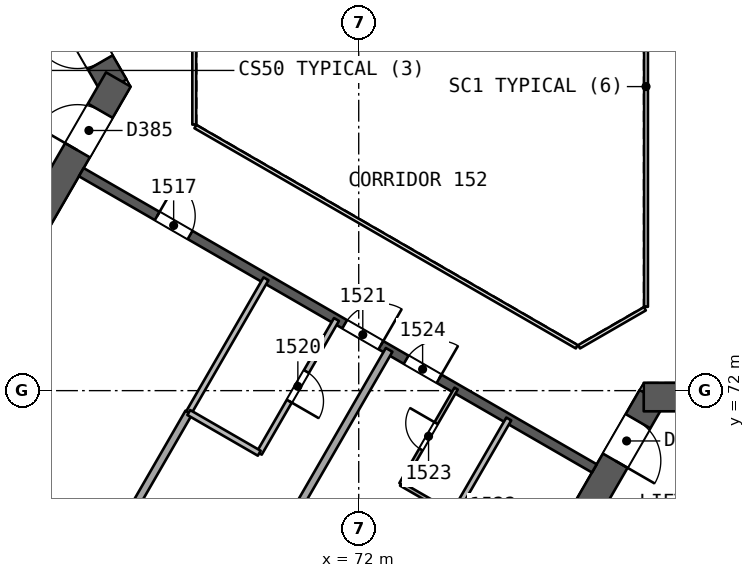
"""IFC4 building model, lengths in metres.
Left out: names, types, materials, properties, quantities, classifications, styles, units other than length and angle.
Written with IfcOpenShell. Run it as: python <this file> out.ifc"""

import sys

from ifc_helpers import new_model, si_unit, direction, frame, frame_2d, origin, place, context, subcontext, project, spatial, rectangle, extrude, element, fill, save


model = new_model("IFC4")
c1 = context("Model", 3, precision=1e-05, world=origin(), true_north=direction((0.0, 1.0)))
c2 = subcontext(c1, "Body", "Model", "MODEL_VIEW")
j1 = project(units=[si_unit("LENGTHUNIT", "METRE"), si_unit("PLANEANGLEUNIT", "RADIAN")], contexts=[c1])
p1 = place(None, origin())
s1 = spatial("IfcSite", under=j1, at=p1, CompositionType="ELEMENT")
p2 = place(p1, origin())
s2 = spatial("IfcBuilding", under=s1, at=p2, CompositionType="ELEMENT")
p3 = place(p2, frame((0.0, 0.0, 68.4)))
s3 = spatial("IfcBuildingStorey", under=s2, at=p3, CompositionType="ELEMENT", Elevation=68.4)
p4 = place(p3, frame((65.567, 80.0, 0.0), z_axis=(0.0, 0.0, 1.0), x_axis=(-0.499988615364, 0.866031976607, 0.0)))
e1 = element("IfcWall", 1, at=p4, inside=s3, PredefinedType="SHEAR", context=c2, shape_type="SweptSolid", body=[
    extrude(rectangle(XDim=10.163, YDim=0.75, at=frame_2d((5.082, 0.0))), origin(), (0.0, 0.0, 1.0), 3.7),
])
p5 = place(p4, frame((0.733, 0.0, 0.0)))
e2 = element("IfcOpeningElement", 2, at=p5, cuts=e1, PredefinedType="OPENING", context=c2, shape_type="SweptSolid", body=[
    extrude(rectangle(XDim=1.2, YDim=2.1, at=frame_2d((0.6, 1.05))), frame((0.0, 0.385, 0.0), z_axis=(0.0, -1.0, 0.0), x_axis=(1.0, 0.0, 0.0)), (0.0, 0.0, 1.0), 0.771),
])
p6 = place(p3, frame((60.673, 71.523, 0.0), z_axis=(0.0, 0.0, 1.0), x_axis=(0.499997052475, 0.866027105532, 0.0)))
e3 = element("IfcWall", 3, at=p6, inside=s3, PredefinedType="SHEAR", context=c2, shape_type="SweptSolid", body=[
    extrude(rectangle(XDim=10.005, YDim=0.75, at=frame_2d((5.002, 0.0))), origin(), (0.0, 0.0, 1.0), 3.7),
])
p7 = place(p6, frame((7.855, 0.0, 0.0)))
e4 = element("IfcOpeningElement", 4, at=p7, cuts=e3, PredefinedType="OPENING", context=c2, shape_type="SweptSolid", body=[
    extrude(rectangle(XDim=1.2, YDim=2.1, at=frame_2d((0.6, 1.05))), frame((0.0, 0.385, 0.0), z_axis=(0.0, -1.0, 0.0), x_axis=(1.0, 0.0, 0.0)), (0.0, 0.0, 1.0), 0.771),
])
p8 = place(p3, frame((79.717, 71.831, 0.0), z_axis=(0.0, 0.0, 1.0), x_axis=(-0.499996230114, -0.866027580318, 0.0)))
e5 = element("IfcWall", 5, at=p8, inside=s3, PredefinedType="SHEAR", context=c2, shape_type="SweptSolid", body=[
    extrude(rectangle(XDim=10.164, YDim=0.75, at=frame_2d((5.082, 0.0))), origin(), (0.0, 0.0, 1.0), 3.7),
])
p9 = place(p8, frame((0.733, 0.0, 0.0)))
e6 = element("IfcOpeningElement", 6, at=p9, cuts=e5, PredefinedType="OPENING", context=c2, shape_type="SweptSolid", body=[
    extrude(rectangle(XDim=1.2, YDim=2.1, at=frame_2d((0.6, 1.05))), frame((0.0, 0.385, 0.0), z_axis=(0.0, -1.0, 0.0), x_axis=(1.0, 0.0, 0.0)), (0.0, 0.0, 1.0), 0.771),
])
p10 = place(p3, frame((89.505, 71.831, 0.0), z_axis=(0.0, 0.0, 1.0), x_axis=(-1.0, 0.0, 0.0)))
e7 = element("IfcWall", 7, at=p10, inside=s3, PredefinedType="SHEAR", context=c2, shape_type="SweptSolid", body=[
    extrude(rectangle(XDim=10.005, YDim=0.75, at=frame_2d((5.002, 0.0))), origin(), (0.0, 0.0, 1.0), 3.7),
])
p11 = place(p10, frame((7.855, 0.0, 0.0)))
e8 = element("IfcOpeningElement", 8, at=p11, cuts=e7, PredefinedType="OPENING", context=c2, shape_type="SweptSolid", body=[
    extrude(rectangle(XDim=1.2, YDim=2.1, at=frame_2d((0.6, 1.05))), frame((0.0, 0.385, 0.0), z_axis=(0.0, -1.0, 0.0), x_axis=(1.0, 0.0, 0.0)), (0.0, 0.0, 1.0), 0.771),
])
p12 = place(p3, frame((64.7, 77.748, 0.0), z_axis=(0.0, 0.0, 1.0), x_axis=(0.866026492143, -0.499998114903, 0.0)))
e9 = element("IfcWall", 9, at=p12, inside=s3, PredefinedType="SHEAR", context=c2, shape_type="SweptSolid", body=[
    extrude(rectangle(XDim=15.588, YDim=0.25, at=frame_2d((7.794, 0.0))), origin(), (0.0, 0.0, 1.0), 3.2),
])
p13 = place(p12, frame((2.306, 0.0, 0.0)))
e10 = element("IfcOpeningElement", 10, at=p13, cuts=e9, PredefinedType="OPENING", context=c2, shape_type="SweptSolid", body=[
    extrude(rectangle(XDim=1.0, YDim=2.1, at=frame_2d((0.5, 1.05))), frame((0.0, 0.135, 0.0), z_axis=(0.0, -1.0, 0.0), x_axis=(1.0, 0.0, 0.0)), (0.0, 0.0, 1.0), 0.271),
])
p14 = place(p12, frame((8.003, 0.0, 0.0)))
e11 = element("IfcOpeningElement", 11, at=p14, cuts=e9, PredefinedType="OPENING", context=c2, shape_type="SweptSolid", body=[
    extrude(rectangle(XDim=1.1, YDim=2.1, at=frame_2d((0.55, 1.05))), frame((0.0, 0.135, 0.0), z_axis=(0.0, -1.0, 0.0), x_axis=(1.0, 0.0, 0.0)), (0.0, 0.0, 1.0), 0.271),
])
p15 = place(p12, frame((9.871, 0.0, 0.0)))
e12 = element("IfcOpeningElement", 12, at=p15, cuts=e9, PredefinedType="OPENING", context=c2, shape_type="SweptSolid", body=[
    extrude(rectangle(XDim=1.0, YDim=2.1, at=frame_2d((0.5, 1.05))), frame((0.0, 0.135, 0.0), z_axis=(0.0, -1.0, 0.0), x_axis=(1.0, 0.0, 0.0)), (0.0, 0.0, 1.0), 0.271),
])
p16 = place(p3, frame((62.822, 63.272, 0.0), z_axis=(0.0, 0.0, 1.0), x_axis=(0.50001657107, 0.866015836261, 0.0)))
e13 = element("IfcWall", 13, at=p16, inside=s3, PredefinedType="PARTITIONING", context=c2, shape_type="SweptSolid", body=[
    extrude(rectangle(XDim=9.413, YDim=0.2, at=frame_2d((4.707, 0.0))), origin(), (0.0, 0.0, 1.0), 3.2),
])
p17 = place(p3, frame((67.529, 71.424, 0.0), z_axis=(0.0, 0.0, 1.0), x_axis=(0.499984252764, 0.866034495264, 0.0)))
e14 = element("IfcWall", 14, at=p17, inside=s3, PredefinedType="PARTITIONING", context=c2, shape_type="SweptSolid", body=[
    extrude(rectangle(XDim=4.063, YDim=0.15, at=frame_2d((2.032, 0.0))), origin(), (0.0, 0.0, 1.0), 3.2),
])
p18 = place(p3, frame((71.414, 73.872, 0.0), z_axis=(0.0, 0.0, 1.0), x_axis=(-0.499984252764, -0.866034495264, 0.0)))
e15 = element("IfcWall", 15, at=p18, inside=s3, PredefinedType="PARTITIONING", context=c2, shape_type="SweptSolid", body=[
    extrude(rectangle(XDim=4.063, YDim=0.15, at=frame_2d((2.032, 0.0))), origin(), (0.0, 0.0, 1.0), 3.2),
])
p19 = place(p18, frame((1.582, 0.0, 0.0)))
e16 = element("IfcOpeningElement", 16, at=p19, cuts=e15, PredefinedType="OPENING", context=c2, shape_type="SweptSolid", body=[
    extrude(rectangle(XDim=0.9, YDim=2.1, at=frame_2d((0.45, 1.05))), frame((0.0, 0.085, 0.0), z_axis=(0.0, -1.0, 0.0), x_axis=(1.0, 0.0, 0.0)), (0.0, 0.0, 1.0), 0.171),
])
p20 = place(p3, frame((69.383, 70.353, 0.0), z_axis=(0.0, 0.0, 1.0), x_axis=(-0.866024183959, 0.500002112793, 0.0)))
e17 = element("IfcWall", 17, at=p20, inside=s3, PredefinedType="PARTITIONING", context=c2, shape_type="SweptSolid", body=[
    extrude(rectangle(XDim=2.141, YDim=0.15, at=frame_2d((1.071, 0.0))), origin(), (0.0, 0.0, 1.0), 3.2),
])
p21 = place(p3, frame((66.062, 61.401, 0.0), z_axis=(0.0, 0.0, 1.0), x_axis=(0.500006826849, 0.866021462265, 0.0)))
e18 = element("IfcWall", 18, at=p21, inside=s3, PredefinedType="PARTITIONING", context=c2, shape_type="SweptSolid", body=[
    extrude(rectangle(XDim=13.476, YDim=0.2, at=frame_2d((6.738, 0.0))), origin(), (0.0, 0.0, 1.0), 3.2),
])
p22 = place(p3, frame((74.498, 68.743, 0.0), z_axis=(0.0, 0.0, 1.0), x_axis=(-0.865989903783, 0.500061482766, 0.0)))
e19 = element("IfcWall", 19, at=p22, inside=s3, PredefinedType="PARTITIONING", context=c2, shape_type="SweptSolid", body=[
    extrude(rectangle(XDim=1.6, YDim=0.1, at=frame_2d((0.8, 0.0))), origin(), (0.0, 0.0, 1.0), 3.2),
])
p23 = place(p3, frame((73.113, 69.543, 0.0), z_axis=(0.0, 0.0, 1.0), x_axis=(0.499987231761, 0.866032775405, 0.0)))
e20 = element("IfcWall", 20, at=p23, inside=s3, PredefinedType="PARTITIONING", context=c2, shape_type="SweptSolid", body=[
    extrude(rectangle(XDim=2.9, YDim=0.1, at=frame_2d((1.45, 0.0))), origin(), (0.0, 0.0, 1.0), 3.2),
])
p24 = place(p23, frame((1.05, 0.0, 0.0)))
e21 = element("IfcOpeningElement", 21, at=p24, cuts=e20, PredefinedType="OPENING", context=c2, shape_type="SweptSolid", body=[
    extrude(rectangle(XDim=0.8, YDim=2.1, at=frame_2d((0.4, 1.05))), frame((0.0, 0.061, 0.0), z_axis=(0.0, -1.0, 0.0), x_axis=(1.0, 0.0, 0.0)), (0.0, 0.0, 1.0), 0.121),
])
p25 = place(p3, frame((75.948, 71.254, 0.0), z_axis=(0.0, 0.0, 1.0), x_axis=(-0.499987231761, -0.866032775405, 0.0)))
e22 = element("IfcWall", 22, at=p25, inside=s3, PredefinedType="PARTITIONING", context=c2, shape_type="SweptSolid", body=[
    extrude(rectangle(XDim=2.9, YDim=0.15, at=frame_2d((1.45, 0.0))), origin(), (0.0, 0.0, 1.0), 3.2),
])
p26 = place(p3, frame((90.443, 47.153, 0.0), z_axis=(0.0, 0.0, 1.0), x_axis=(-0.866024382485, 0.500001768939, 0.0)))
e23 = element("IfcWall", 23, at=p26, inside=s3, PredefinedType="SOLIDWALL", context=c2, shape_type="SweptSolid", body=[
    extrude(rectangle(XDim=59.596, YDim=0.3, at=frame_2d((29.798, 0.0))), origin(), (0.0, 0.0, 1.0), 3.2),
])
p27 = place(p26, frame((28.91, 0.0, 0.0)))
e24 = element("IfcOpeningElement", 24, at=p27, cuts=e23, PredefinedType="OPENING", context=c2, shape_type="SweptSolid", body=[
    extrude(rectangle(XDim=2.4, YDim=2.4, at=frame_2d((1.2, 1.2))), frame((0.0, 0.161, 0.0), z_axis=(0.0, -1.0, 0.0), x_axis=(1.0, 0.0, 0.0)), (0.0, 0.0, 1.0), 0.321),
])
p28 = place(p26, frame((33.586, 0.0, 0.0)))
e25 = element("IfcOpeningElement", 25, at=p28, cuts=e23, PredefinedType="OPENING", context=c2, shape_type="SweptSolid", body=[
    extrude(rectangle(XDim=2.4, YDim=2.4, at=frame_2d((1.2, 1.2))), frame((0.0, 0.161, 0.0), z_axis=(0.0, -1.0, 0.0), x_axis=(1.0, 0.0, 0.0)), (0.0, 0.0, 1.0), 0.321),
])
p29 = place(p26, frame((46.23, 0.0, 0.0)))
e26 = element("IfcOpeningElement", 26, at=p29, cuts=e23, PredefinedType="OPENING", context=c2, shape_type="SweptSolid", body=[
    extrude(rectangle(XDim=2.4, YDim=2.4, at=frame_2d((1.2, 1.2))), frame((0.0, 0.161, 0.0), z_axis=(0.0, -1.0, 0.0), x_axis=(1.0, 0.0, 0.0)), (0.0, 0.0, 1.0), 0.321),
])
p30 = place(p26, frame((12.876, 0.0, 0.0)))
e27 = element("IfcOpeningElement", 27, at=p30, cuts=e23, PredefinedType="OPENING", context=c2, shape_type="SweptSolid", body=[
    extrude(rectangle(XDim=2.4, YDim=2.4, at=frame_2d((1.2, 1.2))), frame((0.0, 0.161, 0.0), z_axis=(0.0, -1.0, 0.0), x_axis=(1.0, 0.0, 0.0)), (0.0, 0.0, 1.0), 0.321),
])
p31 = place(p3, frame((77.135, 64.952, 0.0), z_axis=(0.0, 0.0, 1.0), x_axis=(0.866031916153, 0.499988720078, 0.0)))
e28 = element("IfcWall", 28, at=p31, inside=s3, PredefinedType="SOLIDWALL", context=c2, shape_type="SweptSolid", body=[
    extrude(rectangle(XDim=11.35, YDim=0.2, at=frame_2d((5.675, 0.0))), origin(), (0.0, 0.0, 1.0), 3.2),
])
p32 = place(p3, frame((79.56, 74.206, 0.0), z_axis=(0.0, 0.0, 1.0), x_axis=(0.0, 1.0, 0.0)))
e29 = element("IfcWall", 29, at=p32, inside=s3, PredefinedType="PARTITIONING", context=c2, shape_type="SweptSolid", body=[
    extrude(rectangle(XDim=11.588, YDim=0.1, at=frame_2d((5.794, 0.0))), origin(), (0.0, 0.0, 1.0), 3.2),
])
p33 = place(p3, frame((67.672, 81.0, 0.0), z_axis=(0.0, 0.0, 1.0), x_axis=(0.0, -1.0, 0.0)))
e30 = element("IfcWall", 30, at=p33, inside=s3, PredefinedType="PARTITIONING", context=c2, shape_type="SweptSolid", body=[
    extrude(rectangle(XDim=2.0, YDim=0.1, at=frame_2d((1.0, 0.0))), origin(), (0.0, 0.0, 1.0), 3.2),
])
p34 = place(p3, frame((67.702, 78.948, 0.0), z_axis=(0.0, 0.0, 1.0), x_axis=(0.866026658274, -0.499997827154, 0.0)))
e31 = element("IfcWall", 31, at=p34, inside=s3, PredefinedType="PARTITIONING", context=c2, shape_type="SweptSolid", body=[
    extrude(rectangle(XDim=11.588, YDim=0.1, at=frame_2d((5.794, 0.0))), origin(), (0.0, 0.0, 1.0), 3.2),
])
p35 = place(p3, frame((77.798, 73.154, 0.0), z_axis=(0.0, 0.0, 1.0), x_axis=(0.866041268327, 0.499972520799, 0.0)))
e32 = element("IfcWall", 32, at=p35, inside=s3, PredefinedType="PARTITIONING", context=c2, shape_type="SweptSolid", body=[
    extrude(rectangle(XDim=2.0, YDim=0.1, at=frame_2d((1.0, 0.0))), origin(), (0.0, 0.0, 1.0), 3.2),
])
p36 = place(p13, origin())
e33 = element("IfcDoor", 33, at=p36, inside=s3, OperationType="SINGLE_SWING_LEFT", PredefinedType="NOTDEFINED", context=c2, shape_type="SweptSolid", body=[
    extrude(rectangle(XDim=1.0, YDim=2.1, at=frame_2d((0.5, 1.05))), frame((0.0, 0.025, 0.0), z_axis=(0.0, -1.0, 0.0), x_axis=(1.0, 0.0, 0.0)), (0.0, 0.0, 1.0), 0.05),
])
fill(e10, e33)
p37 = place(p19, origin())
e34 = element("IfcDoor", 34, at=p37, inside=s3, OperationType="SINGLE_SWING_RIGHT", PredefinedType="NOTDEFINED", context=c2, shape_type="SweptSolid", body=[
    extrude(rectangle(XDim=0.9, YDim=2.1, at=frame_2d((0.45, 1.05))), frame((0.0, 0.025, 0.0), z_axis=(0.0, -1.0, 0.0), x_axis=(1.0, 0.0, 0.0)), (0.0, 0.0, 1.0), 0.05),
])
fill(e16, e34)
p38 = place(p14, origin())
e35 = element("IfcDoor", 35, at=p38, inside=s3, OperationType="SINGLE_SWING_RIGHT", PredefinedType="NOTDEFINED", context=c2, shape_type="SweptSolid", body=[
    extrude(rectangle(XDim=1.1, YDim=2.1, at=frame_2d((0.55, 1.05))), frame((0.0, 0.025, 0.0), z_axis=(0.0, -1.0, 0.0), x_axis=(1.0, 0.0, 0.0)), (0.0, 0.0, 1.0), 0.05),
])
fill(e11, e35)
p39 = place(p24, origin())
e36 = element("IfcDoor", 36, at=p39, inside=s3, OperationType="SINGLE_SWING_RIGHT", PredefinedType="NOTDEFINED", context=c2, shape_type="SweptSolid", body=[
    extrude(rectangle(XDim=0.8, YDim=2.1, at=frame_2d((0.4, 1.05))), frame((0.0, 0.025, 0.0), z_axis=(0.0, -1.0, 0.0), x_axis=(1.0, 0.0, 0.0)), (0.0, 0.0, 1.0), 0.05),
])
fill(e21, e36)
p40 = place(p15, origin())
e37 = element("IfcDoor", 37, at=p40, inside=s3, OperationType="SINGLE_SWING_RIGHT", PredefinedType="NOTDEFINED", context=c2, shape_type="SweptSolid", body=[
    extrude(rectangle(XDim=1.0, YDim=2.1, at=frame_2d((0.5, 1.05))), frame((0.0, 0.025, 0.0), z_axis=(0.0, -1.0, 0.0), x_axis=(1.0, 0.0, 0.0)), (0.0, 0.0, 1.0), 0.05),
])
fill(e12, e37)
p41 = place(p5, origin())
e38 = element("IfcDoor", 38, at=p41, inside=s3, OperationType="SINGLE_SWING_RIGHT", PredefinedType="NOTDEFINED", context=c2, shape_type="SweptSolid", body=[
    extrude(rectangle(XDim=1.2, YDim=2.1, at=frame_2d((0.6, 1.05))), frame((0.0, 0.025, 0.0), z_axis=(0.0, -1.0, 0.0), x_axis=(1.0, 0.0, 0.0)), (0.0, 0.0, 1.0), 0.05),
])
fill(e2, e38)
p42 = place(p7, origin())
e39 = element("IfcDoor", 39, at=p42, inside=s3, OperationType="SINGLE_SWING_LEFT", PredefinedType="NOTDEFINED", context=c2, shape_type="SweptSolid", body=[
    extrude(rectangle(XDim=1.2, YDim=2.1, at=frame_2d((0.6, 1.05))), frame((0.0, 0.025, 0.0), z_axis=(0.0, -1.0, 0.0), x_axis=(1.0, 0.0, 0.0)), (0.0, 0.0, 1.0), 0.05),
])
fill(e4, e39)
p43 = place(p9, origin())
e40 = element("IfcDoor", 40, at=p43, inside=s3, OperationType="SINGLE_SWING_RIGHT", PredefinedType="NOTDEFINED", context=c2, shape_type="SweptSolid", body=[
    extrude(rectangle(XDim=1.2, YDim=2.1, at=frame_2d((0.6, 1.05))), frame((0.0, 0.025, 0.0), z_axis=(0.0, -1.0, 0.0), x_axis=(1.0, 0.0, 0.0)), (0.0, 0.0, 1.0), 0.05),
])
fill(e6, e40)
save(model, sys.argv[1])
